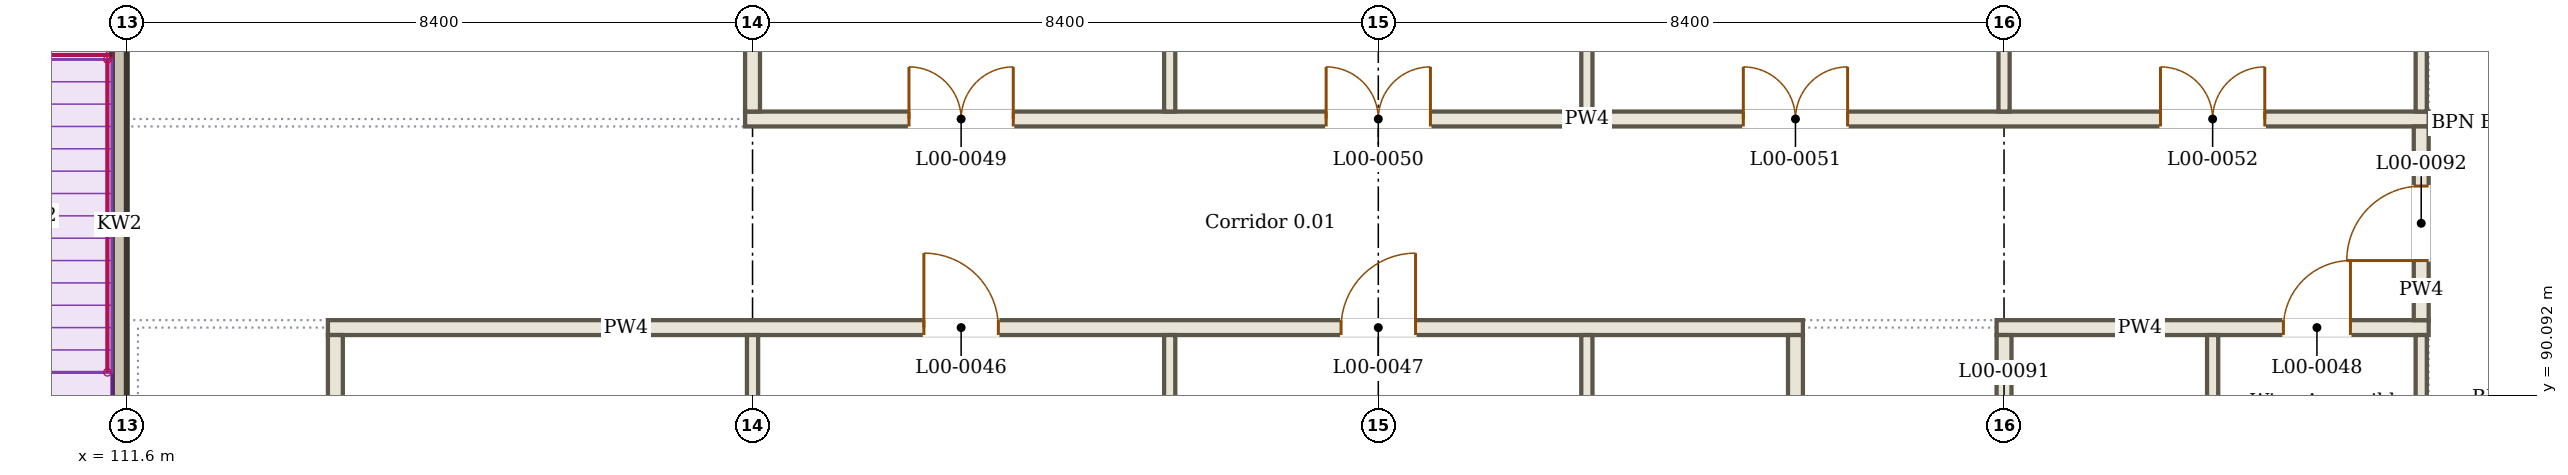
"""IFC4 building model, lengths in metres.
Left out: names, types, materials, properties, quantities, classifications, styles, units other than length and angle.
Written with IfcOpenShell. Run it as: python <this file> out.ifc"""

import sys

from ifc_helpers import new_model, si_unit, direction, frame, frame_2d, origin, place, context, subcontext, project, spatial, rectangle, extrude, element, fill, save


model = new_model("IFC4")
c1 = context("Model", 3, precision=1e-05, world=origin(), true_north=direction((0.0, 1.0)))
c2 = subcontext(c1, "Body", "Model", "MODEL_VIEW")
j1 = project(units=[si_unit("LENGTHUNIT", "METRE"), si_unit("PLANEANGLEUNIT", "RADIAN")], contexts=[c1])
p1 = place(None, origin())
s1 = spatial("IfcSite", under=j1, at=p1, CompositionType="ELEMENT")
p2 = place(p1, origin())
s2 = spatial("IfcBuilding", under=s1, at=p2, CompositionType="ELEMENT")
p3 = place(p2, origin())
s3 = spatial("IfcBuildingStorey", under=s2, at=p3, CompositionType="ELEMENT", Elevation=0.0)
p4 = place(p3, frame((114.3, 91.0, 0.0), z_axis=(0.0, 0.0, 1.0), x_axis=(1.0, 0.0, 0.0)))
e1 = element("IfcWall", 1, at=p4, inside=s3, PredefinedType="PARTITIONING", context=c2, shape_type="SweptSolid", body=[
    extrude(rectangle(XDim=19.8, YDim=0.2, at=frame_2d((9.9, 0.0))), origin(), (0.0, 0.0, 1.0), 3.8),
])
p5 = place(p4, frame((8.0, 0.0, 0.0)))
e2 = element("IfcOpeningElement", 2, at=p5, cuts=e1, PredefinedType="OPENING", context=c2, shape_type="SweptSolid", body=[
    extrude(rectangle(XDim=1.0, YDim=2.1, at=frame_2d((0.5, 1.05))), frame((0.0, 0.11, 0.0), z_axis=(0.0, -1.0, 0.0), x_axis=(1.0, 0.0, 0.0)), (0.0, 0.0, 1.0), 0.22),
])
p6 = place(p4, frame((13.6, 0.0, 0.0)))
e3 = element("IfcOpeningElement", 3, at=p6, cuts=e1, PredefinedType="OPENING", context=c2, shape_type="SweptSolid", body=[
    extrude(rectangle(XDim=1.0, YDim=2.1, at=frame_2d((0.5, 1.05))), frame((0.0, 0.11, 0.0), z_axis=(0.0, -1.0, 0.0), x_axis=(1.0, 0.0, 0.0)), (0.0, 0.0, 1.0), 0.22),
])
p7 = place(p3, frame((136.7, 91.0, 0.0), z_axis=(0.0, 0.0, 1.0), x_axis=(1.0, 0.0, 0.0)))
e4 = element("IfcWall", 4, at=p7, inside=s3, PredefinedType="PARTITIONING", context=c2, shape_type="SweptSolid", body=[
    extrude(rectangle(XDim=5.8, YDim=0.2, at=frame_2d((2.9, 0.0))), origin(), (0.0, 0.0, 1.0), 3.8),
])
p8 = place(p7, frame((3.85, 0.0, 0.0)))
e5 = element("IfcOpeningElement", 5, at=p8, cuts=e4, PredefinedType="OPENING", context=c2, shape_type="SweptSolid", body=[
    extrude(rectangle(XDim=0.9, YDim=2.1, at=frame_2d((0.45, 1.05))), frame((0.0, 0.11, 0.0), z_axis=(0.0, -1.0, 0.0), x_axis=(1.0, 0.0, 0.0)), (0.0, 0.0, 1.0), 0.22),
])
p9 = place(p3, frame((119.9, 93.8, 0.0), z_axis=(0.0, 0.0, 1.0), x_axis=(1.0, 0.0, 0.0)))
e6 = element("IfcWall", 6, at=p9, inside=s3, PredefinedType="PARTITIONING", context=c2, shape_type="SweptSolid", body=[
    extrude(rectangle(XDim=22.6, YDim=0.2, at=frame_2d((11.3, 0.0))), origin(), (0.0, 0.0, 1.0), 3.8),
])
p10 = place(p9, frame((2.2, 0.0, 0.0)))
e7 = element("IfcOpeningElement", 7, at=p10, cuts=e6, PredefinedType="OPENING", context=c2, shape_type="SweptSolid", body=[
    extrude(rectangle(XDim=1.4, YDim=2.1, at=frame_2d((0.7, 1.05))), frame((0.0, 0.11, 0.0), z_axis=(0.0, -1.0, 0.0), x_axis=(1.0, 0.0, 0.0)), (0.0, 0.0, 1.0), 0.22),
])
p11 = place(p9, frame((7.8, 0.0, 0.0)))
e8 = element("IfcOpeningElement", 8, at=p11, cuts=e6, PredefinedType="OPENING", context=c2, shape_type="SweptSolid", body=[
    extrude(rectangle(XDim=1.4, YDim=2.1, at=frame_2d((0.7, 1.05))), frame((0.0, 0.11, 0.0), z_axis=(0.0, -1.0, 0.0), x_axis=(1.0, 0.0, 0.0)), (0.0, 0.0, 1.0), 0.22),
])
p12 = place(p9, frame((13.4, 0.0, 0.0)))
e9 = element("IfcOpeningElement", 9, at=p12, cuts=e6, PredefinedType="OPENING", context=c2, shape_type="SweptSolid", body=[
    extrude(rectangle(XDim=1.4, YDim=2.1, at=frame_2d((0.7, 1.05))), frame((0.0, 0.11, 0.0), z_axis=(0.0, -1.0, 0.0), x_axis=(1.0, 0.0, 0.0)), (0.0, 0.0, 1.0), 0.22),
])
p13 = place(p9, frame((19.0, 0.0, 0.0)))
e10 = element("IfcOpeningElement", 10, at=p13, cuts=e6, PredefinedType="OPENING", context=c2, shape_type="SweptSolid", body=[
    extrude(rectangle(XDim=1.4, YDim=2.1, at=frame_2d((0.7, 1.05))), frame((0.0, 0.11, 0.0), z_axis=(0.0, -1.0, 0.0), x_axis=(1.0, 0.0, 0.0)), (0.0, 0.0, 1.0), 0.22),
])
p14 = place(p3, frame((114.4, 79.95, 0.0), z_axis=(0.0, 0.0, 1.0), x_axis=(0.0, 1.0, 0.0)))
e11 = element("IfcWall", 11, at=p14, inside=s3, PredefinedType="PARTITIONING", context=c2, shape_type="SweptSolid", body=[
    extrude(rectangle(XDim=10.95, YDim=0.2, at=frame_2d((5.475, 0.0))), origin(), (0.0, 0.0, 1.0), 3.8),
])
p15 = place(p14, frame((4.95, 0.0, 0.0)))
e12 = element("IfcOpeningElement", 12, at=p15, cuts=e11, PredefinedType="OPENING", context=c2, shape_type="SweptSolid", body=[
    extrude(rectangle(XDim=1.0, YDim=2.1, at=frame_2d((0.5, 1.05))), frame((0.0, 0.11, 0.0), z_axis=(0.0, -1.0, 0.0), x_axis=(1.0, 0.0, 0.0)), (0.0, 0.0, 1.0), 0.22),
])
p16 = place(p3, frame((120.0, 88.397, 0.0), z_axis=(0.0, 0.0, 1.0), x_axis=(0.0, 1.0, 0.0)))
e13 = element("IfcWall", 13, at=p16, inside=s3, PredefinedType="PARTITIONING", context=c2, shape_type="SweptSolid", body=[
    extrude(rectangle(XDim=2.502, YDim=0.15, at=frame_2d((1.251, 0.0))), origin(), (0.0, 0.0, 1.0), 3.8),
])
p17 = place(p3, frame((120.0, 93.9, 0.0), z_axis=(0.0, 0.0, 1.0), x_axis=(0.0, 1.0, 0.0)))
e14 = element("IfcWall", 14, at=p17, inside=s3, PredefinedType="PARTITIONING", context=c2, shape_type="SweptSolid", body=[
    extrude(rectangle(XDim=2.7, YDim=0.2, at=frame_2d((1.35, 0.0))), origin(), (0.0, 0.0, 1.0), 3.8),
])
for number, where, z_axis, x_axis in (
    (15, (125.6, 80.025, 0.0), (0.0, 0.0, 1.0), (0.0, 1.0, 0.0)),
    (16, (125.6, 93.9, 0.0), (0.0, 0.0, 1.0), (0.0, 1.0, 0.0)),
):
    element("IfcWall", number, at=place(p3, frame(where, z_axis=z_axis, x_axis=x_axis)), inside=s3, PredefinedType="PARTITIONING", context=c2, shape_type="SweptSolid", body=[
        extrude(rectangle(XDim=10.875, YDim=0.15, at=frame_2d((5.438, 0.0))), origin(), (0.0, 0.0, 1.0), 3.8),
    ])
p18 = place(p3, frame((131.2, 79.95, 0.0), z_axis=(0.0, 0.0, 1.0), x_axis=(0.0, 1.0, 0.0)))
e17 = element("IfcWall", 17, at=p18, inside=s3, PredefinedType="PARTITIONING", context=c2, shape_type="SweptSolid", body=[
    extrude(rectangle(XDim=10.95, YDim=0.15, at=frame_2d((5.475, 0.0))), origin(), (0.0, 0.0, 1.0), 3.8),
])
p19 = place(p3, frame((131.2, 93.9, 0.0), z_axis=(0.0, 0.0, 1.0), x_axis=(0.0, 1.0, 0.0)))
e18 = element("IfcWall", 18, at=p19, inside=s3, PredefinedType="PARTITIONING", context=c2, shape_type="SweptSolid", body=[
    extrude(rectangle(XDim=10.875, YDim=0.15, at=frame_2d((5.438, 0.0))), origin(), (0.0, 0.0, 1.0), 3.8),
])
p20 = place(p3, frame((134.0, 79.95, 0.0), z_axis=(0.0, 0.0, 1.0), x_axis=(0.0, 1.0, 0.0)))
e19 = element("IfcWall", 19, at=p20, inside=s3, PredefinedType="PARTITIONING", context=c2, shape_type="SweptSolid", body=[
    extrude(rectangle(XDim=10.95, YDim=0.2, at=frame_2d((5.475, 0.0))), origin(), (0.0, 0.0, 1.0), 3.8),
])
p21 = place(p20, frame((4.95, 0.0, 0.0)))
e20 = element("IfcOpeningElement", 20, at=p21, cuts=e19, PredefinedType="OPENING", context=c2, shape_type="SweptSolid", body=[
    extrude(rectangle(XDim=1.0, YDim=2.1, at=frame_2d((0.5, 1.05))), frame((0.0, 0.11, 0.0), z_axis=(0.0, -1.0, 0.0), x_axis=(1.0, 0.0, 0.0)), (0.0, 0.0, 1.0), 0.22),
])
p22 = place(p3, frame((136.8, 88.2, 0.0), z_axis=(0.0, 0.0, 1.0), x_axis=(0.0, 1.0, 0.0)))
e21 = element("IfcWall", 21, at=p22, inside=s3, PredefinedType="PARTITIONING", context=c2, shape_type="SweptSolid", body=[
    extrude(rectangle(XDim=2.7, YDim=0.2, at=frame_2d((1.35, 0.0))), origin(), (0.0, 0.0, 1.0), 3.8),
])
p23 = place(p22, frame((0.95, 0.0, 0.0)))
e22 = element("IfcOpeningElement", 22, at=p23, cuts=e21, PredefinedType="OPENING", context=c2, shape_type="SweptSolid", body=[
    extrude(rectangle(XDim=0.9, YDim=2.1, at=frame_2d((0.45, 1.05))), frame((0.0, 0.11, 0.0), z_axis=(0.0, -1.0, 0.0), x_axis=(1.0, 0.0, 0.0)), (0.0, 0.0, 1.0), 0.22),
])
p24 = place(p3, frame((136.8, 93.9, 0.0), z_axis=(0.0, 0.0, 1.0), x_axis=(0.0, 1.0, 0.0)))
e23 = element("IfcWall", 23, at=p24, inside=s3, PredefinedType="PARTITIONING", context=c2, shape_type="SweptSolid", body=[
    extrude(rectangle(XDim=2.503, YDim=0.15, at=frame_2d((1.251, 0.0))), origin(), (0.0, 0.0, 1.0), 3.8),
])
for number, where, z_axis, x_axis in (
    (24, (139.6, 88.2, 0.0), (0.0, 0.0, 1.0), (0.0, 1.0, 0.0)),
    (25, (142.4, 88.2, 0.0), (0.0, 0.0, 1.0), (0.0, 1.0, 0.0)),
):
    element("IfcWall", number, at=place(p3, frame(where, z_axis=z_axis, x_axis=x_axis)), inside=s3, PredefinedType="PARTITIONING", context=c2, shape_type="SweptSolid", body=[
        extrude(rectangle(XDim=2.7, YDim=0.15, at=frame_2d((1.35, 0.0))), origin(), (0.0, 0.0, 1.0), 3.95),
    ])
p25 = place(p3, frame((142.4, 91.1, 0.0), z_axis=(0.0, 0.0, 1.0), x_axis=(0.0, 1.0, 0.0)))
e26 = element("IfcWall", 26, at=p25, inside=s3, PredefinedType="PARTITIONING", context=c2, shape_type="SweptSolid", body=[
    extrude(rectangle(XDim=2.6, YDim=0.2, at=frame_2d((1.3, 0.0))), origin(), (0.0, 0.0, 1.0), 3.95),
])
p26 = place(p25, frame((0.8, 0.0, 0.0)))
e27 = element("IfcOpeningElement", 27, at=p26, cuts=e26, PredefinedType="OPENING", context=c2, shape_type="SweptSolid", body=[
    extrude(rectangle(XDim=1.0, YDim=2.1, at=frame_2d((0.5, 1.05))), frame((0.0, 0.11, 0.0), z_axis=(0.0, -1.0, 0.0), x_axis=(1.0, 0.0, 0.0)), (0.0, 0.0, 1.0), 0.22),
])
p27 = place(p3, frame((142.4, 93.9, 0.0), z_axis=(0.0, 0.0, 1.0), x_axis=(0.0, 1.0, 0.0)))
e28 = element("IfcWall", 28, at=p27, inside=s3, PredefinedType="PARTITIONING", context=c2, shape_type="SweptSolid", body=[
    extrude(rectangle(XDim=10.875, YDim=0.15, at=frame_2d((5.438, 0.0))), origin(), (0.0, 0.0, 1.0), 3.8),
])
p28 = place(p3, frame((111.5, 88.4, 0.0), z_axis=(0.0, 0.0, 1.0), x_axis=(0.0, 1.0, 0.0)))
e29 = element("IfcWall", 29, at=p28, inside=s3, PredefinedType="SOLIDWALL", context=c2, shape_type="SweptSolid", body=[
    extrude(rectangle(XDim=7.975, YDim=0.2, at=frame_2d((3.988, 0.0))), origin(), (0.0, 0.0, 1.0), 4.5),
])
p29 = place(p5, origin())
e30 = element("IfcDoor", 30, at=p29, inside=s3, OperationType="SINGLE_SWING_LEFT", PredefinedType="DOOR", context=c2, shape_type="SweptSolid", body=[
    extrude(rectangle(XDim=1.0, YDim=2.1, at=frame_2d((0.5, 1.05))), frame((0.0, 0.025, 0.0), z_axis=(0.0, -1.0, 0.0), x_axis=(1.0, 0.0, 0.0)), (0.0, 0.0, 1.0), 0.05),
])
fill(e2, e30)
p30 = place(p6, origin())
e31 = element("IfcDoor", 31, at=p30, inside=s3, OperationType="SINGLE_SWING_RIGHT", PredefinedType="DOOR", context=c2, shape_type="SweptSolid", body=[
    extrude(rectangle(XDim=1.0, YDim=2.1, at=frame_2d((0.5, 1.05))), frame((0.0, 0.025, 0.0), z_axis=(0.0, -1.0, 0.0), x_axis=(1.0, 0.0, 0.0)), (0.0, 0.0, 1.0), 0.05),
])
fill(e3, e31)
p31 = place(p8, origin())
e32 = element("IfcDoor", 32, at=p31, inside=s3, OperationType="SINGLE_SWING_RIGHT", PredefinedType="DOOR", context=c2, shape_type="SweptSolid", body=[
    extrude(rectangle(XDim=0.9, YDim=2.1, at=frame_2d((0.45, 1.05))), frame((0.0, 0.025, 0.0), z_axis=(0.0, -1.0, 0.0), x_axis=(1.0, 0.0, 0.0)), (0.0, 0.0, 1.0), 0.05),
])
fill(e5, e32)
p32 = place(p10, origin())
e33 = element("IfcDoor", 33, at=p32, inside=s3, OperationType="DOUBLE_DOOR_SINGLE_SWING", PredefinedType="DOOR", context=c2, shape_type="SweptSolid", body=[
    extrude(rectangle(XDim=1.4, YDim=2.1, at=frame_2d((0.7, 1.05))), frame((0.0, 0.025, 0.0), z_axis=(0.0, -1.0, 0.0), x_axis=(1.0, 0.0, 0.0)), (0.0, 0.0, 1.0), 0.05),
])
fill(e7, e33)
p33 = place(p11, origin())
e34 = element("IfcDoor", 34, at=p33, inside=s3, OperationType="DOUBLE_DOOR_SINGLE_SWING", PredefinedType="DOOR", context=c2, shape_type="SweptSolid", body=[
    extrude(rectangle(XDim=1.4, YDim=2.1, at=frame_2d((0.7, 1.05))), frame((0.0, 0.025, 0.0), z_axis=(0.0, -1.0, 0.0), x_axis=(1.0, 0.0, 0.0)), (0.0, 0.0, 1.0), 0.05),
])
fill(e8, e34)
p34 = place(p12, origin())
e35 = element("IfcDoor", 35, at=p34, inside=s3, OperationType="DOUBLE_DOOR_SINGLE_SWING", PredefinedType="DOOR", context=c2, shape_type="SweptSolid", body=[
    extrude(rectangle(XDim=1.4, YDim=2.1, at=frame_2d((0.7, 1.05))), frame((0.0, 0.025, 0.0), z_axis=(0.0, -1.0, 0.0), x_axis=(1.0, 0.0, 0.0)), (0.0, 0.0, 1.0), 0.05),
])
fill(e9, e35)
p35 = place(p13, origin())
e36 = element("IfcDoor", 36, at=p35, inside=s3, OperationType="DOUBLE_DOOR_SINGLE_SWING", PredefinedType="DOOR", context=c2, shape_type="SweptSolid", body=[
    extrude(rectangle(XDim=1.4, YDim=2.1, at=frame_2d((0.7, 1.05))), frame((0.0, 0.025, 0.0), z_axis=(0.0, -1.0, 0.0), x_axis=(1.0, 0.0, 0.0)), (0.0, 0.0, 1.0), 0.05),
])
fill(e10, e36)
p36 = place(p26, origin())
e37 = element("IfcDoor", 37, at=p36, inside=s3, OperationType="SINGLE_SWING_LEFT", PredefinedType="DOOR", context=c2, shape_type="SweptSolid", body=[
    extrude(rectangle(XDim=1.0, YDim=2.1, at=frame_2d((0.5, 1.05))), frame((0.0, 0.025, 0.0), z_axis=(0.0, -1.0, 0.0), x_axis=(1.0, 0.0, 0.0)), (0.0, 0.0, 1.0), 0.05),
])
fill(e27, e37)
save(model, sys.argv[1])
